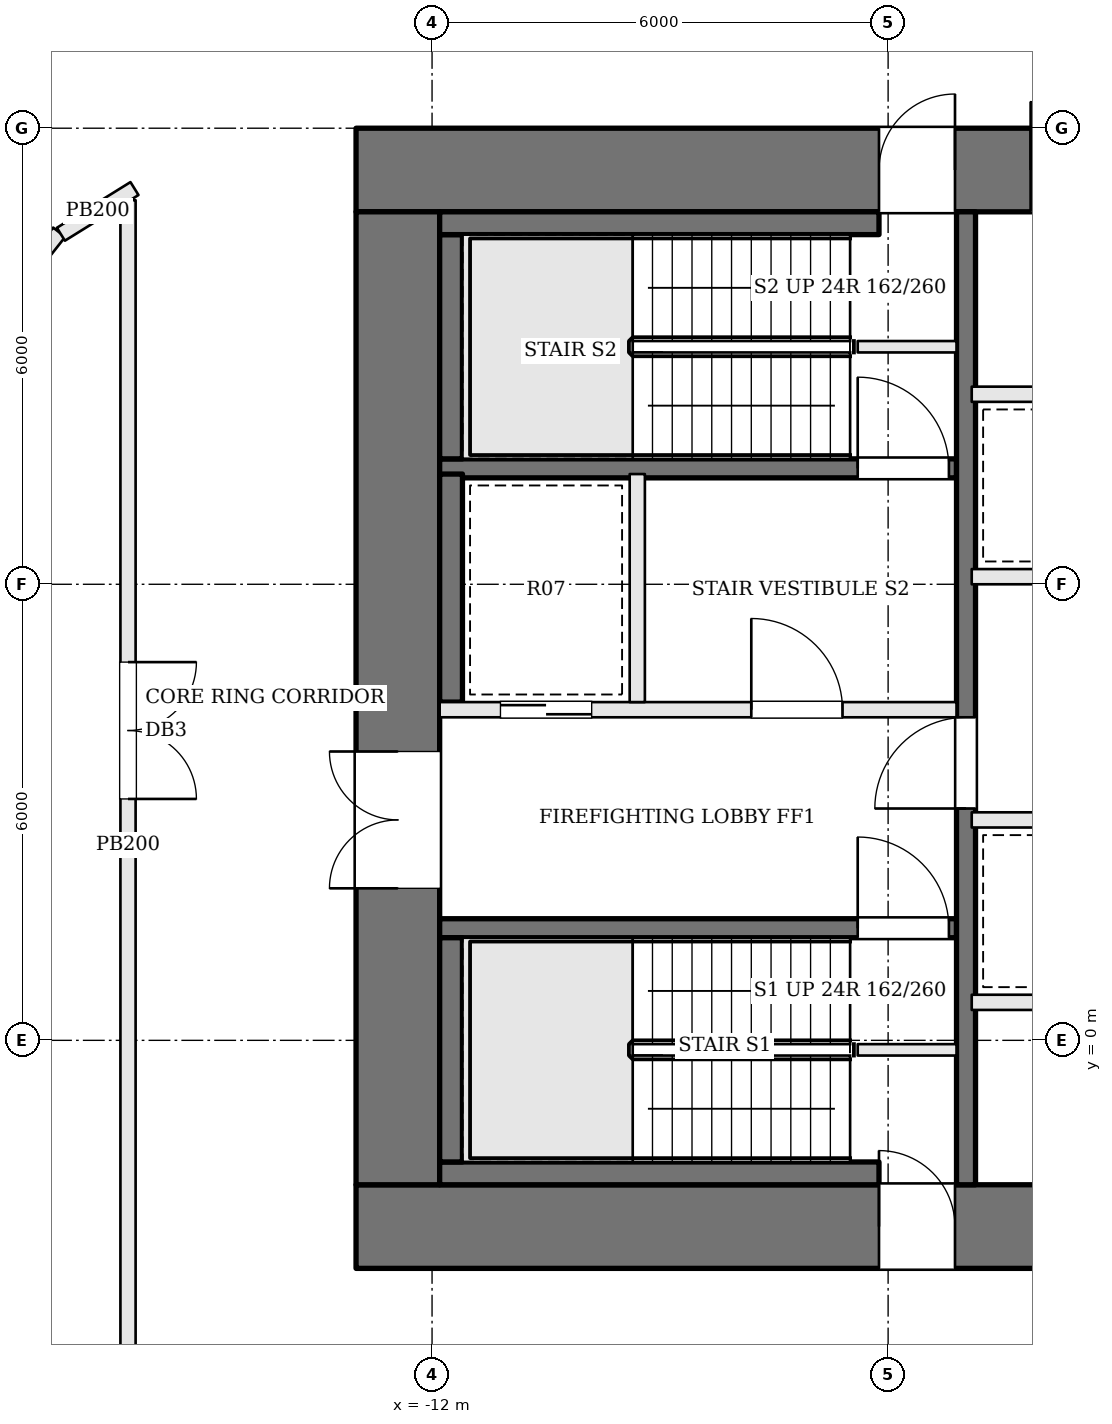
"""IFC4 building model, lengths in metres.
Left out: names, types, materials, properties, quantities, classifications, styles, units other than length and angle.
Written with IfcOpenShell. Run it as: python <this file> out.ifc"""

import sys

from ifc_helpers import new_model, si_unit, direction, frame, frame_2d, origin, place, context, subcontext, project, spatial, rectangle, extrude, element, fill, save


model = new_model("IFC4")
c1 = context("Model", 3, precision=1e-05, world=origin(), true_north=direction((0.0, 1.0)))
c2 = subcontext(c1, "Body", "Model", "MODEL_VIEW")
j1 = project(units=[si_unit("LENGTHUNIT", "METRE"), si_unit("PLANEANGLEUNIT", "RADIAN")], contexts=[c1])
p1 = place(None, origin())
s1 = spatial("IfcSite", under=j1, at=p1, CompositionType="ELEMENT")
p2 = place(p1, origin())
s2 = spatial("IfcBuilding", under=s1, at=p2, CompositionType="ELEMENT")
p3 = place(p2, frame((0.0, 0.0, 150.0)))
s3 = spatial("IfcBuildingStorey", under=s2, at=p3, CompositionType="ELEMENT", Elevation=150.0)
p4 = place(p3, frame((-13.0, 11.45, 0.0), z_axis=(0.0, 0.0, 1.0), x_axis=(1.0, 0.0, 0.0)))
e1 = element("IfcWall", 1, at=p4, inside=s3, PredefinedType="SHEAR", context=c2, shape_type="SweptSolid", body=[
    extrude(rectangle(XDim=26.0, YDim=1.1, at=frame_2d((13.0, 0.0))), origin(), (0.0, 0.0, 1.0), 3.9),
])
p5 = place(p4, frame((8.875, 0.0, 0.0)))
e2 = element("IfcOpeningElement", 2, at=p5, cuts=e1, PredefinedType="OPENING", context=c2, shape_type="SweptSolid", body=[
    extrude(rectangle(XDim=0.9, YDim=2.1, at=frame_2d((0.45, 1.05))), frame((0.0, 0.56, 0.0), z_axis=(0.0, -1.0, 0.0), x_axis=(1.0, 0.0, 0.0)), (0.0, 0.0, 1.0), 1.12),
])
p6 = place(p4, frame((11.425, 0.0, 0.0)))
e3 = element("IfcOpeningElement", 3, at=p6, cuts=e1, PredefinedType="OPENING", context=c2, shape_type="SweptSolid", body=[
    extrude(rectangle(XDim=0.7, YDim=2.1, at=frame_2d((0.35, 1.05))), frame((0.0, 0.56, 0.0), z_axis=(0.0, -1.0, 0.0), x_axis=(1.0, 0.0, 0.0)), (0.0, 0.0, 1.0), 1.12),
])
p7 = place(p4, frame((14.125, 0.0, 0.0)))
e4 = element("IfcOpeningElement", 4, at=p7, cuts=e1, PredefinedType="OPENING", context=c2, shape_type="SweptSolid", body=[
    extrude(rectangle(XDim=1.0, YDim=2.1, at=frame_2d((0.5, 1.05))), frame((0.0, 0.56, 0.0), z_axis=(0.0, -1.0, 0.0), x_axis=(1.0, 0.0, 0.0)), (0.0, 0.0, 1.0), 1.12),
])
p8 = place(p4, frame((16.725, 0.0, 0.0)))
e5 = element("IfcOpeningElement", 5, at=p8, cuts=e1, PredefinedType="OPENING", context=c2, shape_type="SweptSolid", body=[
    extrude(rectangle(XDim=0.7, YDim=2.1, at=frame_2d((0.35, 1.05))), frame((0.0, 0.56, 0.0), z_axis=(0.0, -1.0, 0.0), x_axis=(1.0, 0.0, 0.0)), (0.0, 0.0, 1.0), 1.12),
])
p9 = place(p4, frame((6.88, 0.0, 0.0)))
e6 = element("IfcOpeningElement", 6, at=p9, cuts=e1, PredefinedType="OPENING", context=c2, shape_type="SweptSolid", body=[
    extrude(rectangle(XDim=1.0, YDim=2.1, at=frame_2d((0.5, 1.05))), frame((0.0, 0.56, 0.0), z_axis=(0.0, -1.0, 0.0), x_axis=(1.0, 0.0, 0.0)), (0.0, 0.0, 1.0), 1.12),
])
p10 = place(p4, frame((18.12, 0.0, 0.0)))
e7 = element("IfcOpeningElement", 7, at=p10, cuts=e1, PredefinedType="OPENING", context=c2, shape_type="SweptSolid", body=[
    extrude(rectangle(XDim=1.0, YDim=2.1, at=frame_2d((0.5, 1.05))), frame((0.0, 0.56, 0.0), z_axis=(0.0, -1.0, 0.0), x_axis=(1.0, 0.0, 0.0)), (0.0, 0.0, 1.0), 1.12),
])
p11 = place(p3, frame((-13.0, -2.45, 0.0), z_axis=(0.0, 0.0, 1.0), x_axis=(1.0, 0.0, 0.0)))
e8 = element("IfcWall", 8, at=p11, inside=s3, PredefinedType="SHEAR", context=c2, shape_type="SweptSolid", body=[
    extrude(rectangle(XDim=26.0, YDim=1.1, at=frame_2d((13.0, 0.0))), origin(), (0.0, 0.0, 1.0), 3.9),
])
p12 = place(p11, frame((9.225, 0.0, 0.0)))
e9 = element("IfcOpeningElement", 9, at=p12, cuts=e8, PredefinedType="OPENING", context=c2, shape_type="SweptSolid", body=[
    extrude(rectangle(XDim=1.0, YDim=2.1, at=frame_2d((0.5, 1.05))), frame((0.0, 0.56, 0.0), z_axis=(0.0, -1.0, 0.0), x_axis=(1.0, 0.0, 0.0)), (0.0, 0.0, 1.0), 1.12),
])
p13 = place(p11, frame((11.825, 0.0, 0.0)))
e10 = element("IfcOpeningElement", 10, at=p13, cuts=e8, PredefinedType="OPENING", context=c2, shape_type="SweptSolid", body=[
    extrude(rectangle(XDim=0.7, YDim=2.1, at=frame_2d((0.35, 1.05))), frame((0.0, 0.56, 0.0), z_axis=(0.0, -1.0, 0.0), x_axis=(1.0, 0.0, 0.0)), (0.0, 0.0, 1.0), 1.12),
])
p14 = place(p11, frame((13.875, 0.0, 0.0)))
e11 = element("IfcOpeningElement", 11, at=p14, cuts=e8, PredefinedType="OPENING", context=c2, shape_type="SweptSolid", body=[
    extrude(rectangle(XDim=0.7, YDim=2.1, at=frame_2d((0.35, 1.05))), frame((0.0, 0.56, 0.0), z_axis=(0.0, -1.0, 0.0), x_axis=(1.0, 0.0, 0.0)), (0.0, 0.0, 1.0), 1.12),
])
p15 = place(p11, frame((16.225, 0.0, 0.0)))
e12 = element("IfcOpeningElement", 12, at=p15, cuts=e8, PredefinedType="OPENING", context=c2, shape_type="SweptSolid", body=[
    extrude(rectangle(XDim=0.9, YDim=2.1, at=frame_2d((0.45, 1.05))), frame((0.0, 0.56, 0.0), z_axis=(0.0, -1.0, 0.0), x_axis=(1.0, 0.0, 0.0)), (0.0, 0.0, 1.0), 1.12),
])
p16 = place(p11, frame((6.88, 0.0, 0.0)))
e13 = element("IfcOpeningElement", 13, at=p16, cuts=e8, PredefinedType="OPENING", context=c2, shape_type="SweptSolid", body=[
    extrude(rectangle(XDim=1.0, YDim=2.1, at=frame_2d((0.5, 1.05))), frame((0.0, 0.56, 0.0), z_axis=(0.0, -1.0, 0.0), x_axis=(1.0, 0.0, 0.0)), (0.0, 0.0, 1.0), 1.12),
])
p17 = place(p11, frame((18.12, 0.0, 0.0)))
e14 = element("IfcOpeningElement", 14, at=p17, cuts=e8, PredefinedType="OPENING", context=c2, shape_type="SweptSolid", body=[
    extrude(rectangle(XDim=1.0, YDim=2.1, at=frame_2d((0.5, 1.05))), frame((0.0, 0.56, 0.0), z_axis=(0.0, -1.0, 0.0), x_axis=(1.0, 0.0, 0.0)), (0.0, 0.0, 1.0), 1.12),
])
p18 = place(p3, frame((-12.45, -1.9, 0.0), z_axis=(0.0, 0.0, 1.0), x_axis=(0.0, 1.0, 0.0)))
e15 = element("IfcWall", 15, at=p18, inside=s3, PredefinedType="SHEAR", context=c2, shape_type="SweptSolid", body=[
    extrude(rectangle(XDim=12.8, YDim=1.1, at=frame_2d((6.4, 0.0))), origin(), (0.0, 0.0, 1.0), 3.9),
])
p19 = place(p18, frame((3.9, 0.0, 0.0)))
e16 = element("IfcOpeningElement", 16, at=p19, cuts=e15, PredefinedType="OPENING", context=c2, shape_type="SweptSolid", body=[
    extrude(rectangle(XDim=1.8, YDim=2.1, at=frame_2d((0.9, 1.05))), frame((0.0, 0.56, 0.0), z_axis=(0.0, -1.0, 0.0), x_axis=(1.0, 0.0, 0.0)), (0.0, 0.0, 1.0), 1.12),
])
for number, where, z_axis, x_axis in (
    (17, (-6.4, -0.125, 0.0), (0.0, 0.0, 1.0), (1.0, 0.0, 0.0)),
    (18, (-6.4, 9.125, 0.0), (0.0, 0.0, 1.0), (1.0, 0.0, 0.0)),
):
    element("IfcWall", number, at=place(p3, frame(where, z_axis=z_axis, x_axis=x_axis)), inside=s3, PredefinedType="SOLIDWALL", context=c2, shape_type="SweptSolid", body=[
        extrude(rectangle(XDim=1.3, YDim=0.15, at=frame_2d((0.65, 0.0))), origin(), (0.0, 0.0, 1.0), 3.7),
    ])
p20 = place(p3, frame((-11.9, 1.475, 0.0), z_axis=(0.0, 0.0, 1.0), x_axis=(1.0, 0.0, 0.0)))
e19 = element("IfcWall", 19, at=p20, inside=s3, PredefinedType="SOLIDWALL", context=c2, shape_type="SweptSolid", body=[
    extrude(rectangle(XDim=6.8, YDim=0.25, at=frame_2d((3.4, 0.0))), origin(), (0.0, 0.0, 1.0), 3.7),
])
p21 = place(p20, frame((5.5, 0.0, 0.0)))
e20 = element("IfcOpeningElement", 20, at=p21, cuts=e19, PredefinedType="OPENING", context=c2, shape_type="SweptSolid", body=[
    extrude(rectangle(XDim=1.2, YDim=2.1, at=frame_2d((0.6, 1.05))), frame((0.0, 0.135, 0.0), z_axis=(0.0, -1.0, 0.0), x_axis=(1.0, 0.0, 0.0)), (0.0, 0.0, 1.0), 0.27),
])
p22 = place(p3, frame((-11.9, 4.35, 0.0), z_axis=(0.0, 0.0, 1.0), x_axis=(1.0, 0.0, 0.0)))
e21 = element("IfcWall", 21, at=p22, inside=s3, PredefinedType="SOLIDWALL", context=c2, shape_type="SweptSolid", body=[
    extrude(rectangle(XDim=6.8, YDim=0.2, at=frame_2d((3.4, 0.0))), origin(), (0.0, 0.0, 1.0), 3.7),
])
p23 = place(p22, frame((4.1, 0.0, 0.0)))
e22 = element("IfcOpeningElement", 22, at=p23, cuts=e21, PredefinedType="OPENING", context=c2, shape_type="SweptSolid", body=[
    extrude(rectangle(XDim=1.2, YDim=2.1, at=frame_2d((0.6, 1.05))), frame((0.0, 0.11, 0.0), z_axis=(0.0, -1.0, 0.0), x_axis=(1.0, 0.0, 0.0)), (0.0, 0.0, 1.0), 0.22),
])
p24 = place(p22, frame((0.8, 0.0, 0.0)))
e23 = element("IfcOpeningElement", 23, at=p24, cuts=e21, PredefinedType="OPENING", context=c2, shape_type="SweptSolid", body=[
    extrude(rectangle(XDim=1.2, YDim=2.1, at=frame_2d((0.6, 1.05))), frame((0.0, 0.11, 0.0), z_axis=(0.0, -1.0, 0.0), x_axis=(1.0, 0.0, 0.0)), (0.0, 0.0, 1.0), 0.22),
])
p25 = place(p3, frame((-11.9, 7.525, 0.0), z_axis=(0.0, 0.0, 1.0), x_axis=(1.0, 0.0, 0.0)))
e24 = element("IfcWall", 24, at=p25, inside=s3, PredefinedType="SOLIDWALL", context=c2, shape_type="SweptSolid", body=[
    extrude(rectangle(XDim=6.8, YDim=0.25, at=frame_2d((3.4, 0.0))), origin(), (0.0, 0.0, 1.0), 3.7),
])
p26 = place(p25, frame((5.5, 0.0, 0.0)))
e25 = element("IfcOpeningElement", 25, at=p26, cuts=e24, PredefinedType="OPENING", context=c2, shape_type="SweptSolid", body=[
    extrude(rectangle(XDim=1.2, YDim=2.1, at=frame_2d((0.6, 1.05))), frame((0.0, 0.135, 0.0), z_axis=(0.0, -1.0, 0.0), x_axis=(1.0, 0.0, 0.0)), (0.0, 0.0, 1.0), 0.27),
])
p27 = place(p3, frame((-9.3, 4.45, 0.0), z_axis=(0.0, 0.0, 1.0), x_axis=(0.0, 1.0, 0.0)))
e26 = element("IfcWall", 26, at=p27, inside=s3, PredefinedType="SOLIDWALL", context=c2, shape_type="SweptSolid", body=[
    extrude(rectangle(XDim=3.0, YDim=0.2, at=frame_2d((1.5, 0.0))), origin(), (0.0, 0.0, 1.0), 3.7),
])
p28 = place(p3, frame((-4.975, -1.9, 0.0), z_axis=(0.0, 0.0, 1.0), x_axis=(0.0, 1.0, 0.0)))
e27 = element("IfcWall", 27, at=p28, inside=s3, PredefinedType="SOLIDWALL", context=c2, shape_type="SweptSolid", body=[
    extrude(rectangle(XDim=12.8, YDim=0.25, at=frame_2d((6.4, 0.0))), origin(), (0.0, 0.0, 1.0), 3.7),
])
p29 = place(p28, frame((4.95, 0.0, 0.0)))
e28 = element("IfcOpeningElement", 28, at=p29, cuts=e27, PredefinedType="OPENING", context=c2, shape_type="SweptSolid", body=[
    extrude(rectangle(XDim=1.2, YDim=2.1, at=frame_2d((0.6, 1.05))), frame((0.0, 0.135, 0.0), z_axis=(0.0, -1.0, 0.0), x_axis=(1.0, 0.0, 0.0)), (0.0, 0.0, 1.0), 0.27),
])
p30 = place(p3, frame((-11.9, -1.75, 0.0), z_axis=(0.0, 0.0, 1.0), x_axis=(1.0, 0.0, 0.0)))
e29 = element("IfcWall", 29, at=p30, inside=s3, PredefinedType="SOLIDWALL", context=c2, shape_type="SweptSolid", body=[
    extrude(rectangle(XDim=5.78, YDim=0.3, at=frame_2d((2.89, 0.0))), origin(), (0.0, 0.0, 1.0), 3.7),
])
p31 = place(p3, frame((-11.75, -1.6, 0.0), z_axis=(0.0, 0.0, 1.0), x_axis=(0.0, 1.0, 0.0)))
e30 = element("IfcWall", 30, at=p31, inside=s3, PredefinedType="SOLIDWALL", context=c2, shape_type="SweptSolid", body=[
    extrude(rectangle(XDim=2.95, YDim=0.3, at=frame_2d((1.475, 0.0))), origin(), (0.0, 0.0, 1.0), 3.7),
])
p32 = place(p3, frame((-11.75, 4.45, 0.0), z_axis=(0.0, 0.0, 1.0), x_axis=(0.0, 1.0, 0.0)))
e31 = element("IfcWall", 31, at=p32, inside=s3, PredefinedType="SOLIDWALL", context=c2, shape_type="SweptSolid", body=[
    extrude(rectangle(XDim=3.0, YDim=0.3, at=frame_2d((1.5, 0.0))), origin(), (0.0, 0.0, 1.0), 3.7),
])
p33 = place(p3, frame((-11.75, 7.65, 0.0), z_axis=(0.0, 0.0, 1.0), x_axis=(0.0, 1.0, 0.0)))
e32 = element("IfcWall", 32, at=p33, inside=s3, PredefinedType="SOLIDWALL", context=c2, shape_type="SweptSolid", body=[
    extrude(rectangle(XDim=2.95, YDim=0.3, at=frame_2d((1.475, 0.0))), origin(), (0.0, 0.0, 1.0), 3.7),
])
p34 = place(p3, frame((-11.9, 10.75, 0.0), z_axis=(0.0, 0.0, 1.0), x_axis=(1.0, 0.0, 0.0)))
e33 = element("IfcWall", 33, at=p34, inside=s3, PredefinedType="SOLIDWALL", context=c2, shape_type="SweptSolid", body=[
    extrude(rectangle(XDim=5.78, YDim=0.3, at=frame_2d((2.89, 0.0))), origin(), (0.0, 0.0, 1.0), 3.7),
])
p35 = place(p3, frame((-4.9, 0.5, 0.0), z_axis=(0.0, 0.0, 1.0), x_axis=(1.0, 0.0, 0.0)))
e34 = element("IfcWall", 34, at=p35, inside=s3, PredefinedType="SOLIDWALL", context=c2, shape_type="SweptSolid", body=[
    extrude(rectangle(XDim=9.8, YDim=0.2, at=frame_2d((4.9, 0.0))), origin(), (0.0, 0.0, 1.0), 3.7),
])
p36 = place(p3, frame((-4.9, 2.9, 0.0), z_axis=(0.0, 0.0, 1.0), x_axis=(1.0, 0.0, 0.0)))
e35 = element("IfcWall", 35, at=p36, inside=s3, PredefinedType="SOLIDWALL", context=c2, shape_type="SweptSolid", body=[
    extrude(rectangle(XDim=9.8, YDim=0.2, at=frame_2d((4.9, 0.0))), origin(), (0.0, 0.0, 1.0), 3.7),
])
p37 = place(p36, frame((2.613, 0.0, 0.0)))
e36 = element("IfcOpeningElement", 36, at=p37, cuts=e35, PredefinedType="OPENING", context=c2, shape_type="SweptSolid", body=[
    extrude(rectangle(XDim=0.9, YDim=2.1, at=frame_2d((0.45, 1.05))), frame((0.0, 0.11, 0.0), z_axis=(0.0, -1.0, 0.0), x_axis=(1.0, 0.0, 0.0)), (0.0, 0.0, 1.0), 0.22),
])
p38 = place(p36, frame((7.463, 0.0, 0.0)))
e37 = element("IfcOpeningElement", 37, at=p38, cuts=e35, PredefinedType="OPENING", context=c2, shape_type="SweptSolid", body=[
    extrude(rectangle(XDim=1.0, YDim=2.1, at=frame_2d((0.5, 1.05))), frame((0.0, 0.11, 0.0), z_axis=(0.0, -1.0, 0.0), x_axis=(1.0, 0.0, 0.0)), (0.0, 0.0, 1.0), 0.22),
])
for number, where, z_axis, x_axis in (
    (38, (-4.9, 6.1, 0.0), (0.0, 0.0, 1.0), (1.0, 0.0, 0.0)),
    (39, (-4.9, 8.5, 0.0), (0.0, 0.0, 1.0), (1.0, 0.0, 0.0)),
):
    element("IfcWall", number, at=place(p3, frame(where, z_axis=z_axis, x_axis=x_axis)), inside=s3, PredefinedType="SOLIDWALL", context=c2, shape_type="SweptSolid", body=[
        extrude(rectangle(XDim=9.8, YDim=0.2, at=frame_2d((4.9, 0.0))), origin(), (0.0, 0.0, 1.0), 3.7),
    ])
p39 = place(p3, frame((-19.849, 6.895, 0.0), z_axis=(0.0, 0.0, 1.0), x_axis=(0.618811760178, 0.785539308669, 0.0)))
e40 = element("IfcWall", 40, at=p39, inside=s3, PredefinedType="PARTITIONING", context=c2, shape_type="SweptSolid", body=[
    extrude(rectangle(XDim=4.756, YDim=0.2, at=frame_2d((2.378, 0.0))), origin(), (0.0, 0.0, 1.0), 3.7),
])
p40 = place(p3, frame((-16.883, 10.605, 0.0), z_axis=(0.0, 0.0, 1.0), x_axis=(0.84954745962, 0.527512193085, 0.0)))
e41 = element("IfcWall", 41, at=p40, inside=s3, PredefinedType="PARTITIONING", context=c2, shape_type="SweptSolid", body=[
    extrude(rectangle(XDim=1.139, YDim=0.2, at=frame_2d((0.57, 0.0))), origin(), (0.0, 0.0, 1.0), 3.7),
])
p41 = place(p3, frame((-16.0, 11.053, 0.0), z_axis=(0.0, 0.0, 1.0), x_axis=(0.0, -1.0, 0.0)))
e42 = element("IfcWall", 42, at=p41, inside=s3, PredefinedType="PARTITIONING", context=c2, shape_type="SweptSolid", body=[
    extrude(rectangle(XDim=16.953, YDim=0.2, at=frame_2d((8.477, 0.0))), origin(), (0.0, 0.0, 1.0), 3.7),
])
p42 = place(p41, frame((6.077, 0.0, 0.0)))
e43 = element("IfcOpeningElement", 43, at=p42, cuts=e42, PredefinedType="OPENING", context=c2, shape_type="SweptSolid", body=[
    extrude(rectangle(XDim=1.8, YDim=2.1, at=frame_2d((0.9, 1.05))), frame((0.0, 0.11, 0.0), z_axis=(0.0, -1.0, 0.0), x_axis=(1.0, 0.0, 0.0)), (0.0, 0.0, 1.0), 0.22),
])
p43 = place(p19, origin())
e44 = element("IfcDoor", 44, at=p43, inside=s3, OperationType="DOUBLE_DOOR_SINGLE_SWING", PredefinedType="DOOR", context=c2, shape_type="SweptSolid", body=[
    extrude(rectangle(XDim=1.8, YDim=2.1, at=frame_2d((0.9, 1.05))), frame((0.0, 0.025, 0.0), z_axis=(0.0, -1.0, 0.0), x_axis=(1.0, 0.0, 0.0)), (0.0, 0.0, 1.0), 0.05),
])
fill(e16, e44)
p44 = place(p29, origin())
e45 = element("IfcDoor", 45, at=p44, inside=s3, OperationType="SINGLE_SWING_LEFT", PredefinedType="DOOR", context=c2, shape_type="SweptSolid", body=[
    extrude(rectangle(XDim=1.2, YDim=2.1, at=frame_2d((0.6, 1.05))), frame((0.0, 0.025, 0.0), z_axis=(0.0, -1.0, 0.0), x_axis=(1.0, 0.0, 0.0)), (0.0, 0.0, 1.0), 0.05),
])
fill(e28, e45)
p45 = place(p23, origin())
e46 = element("IfcDoor", 46, at=p45, inside=s3, OperationType="SINGLE_SWING_LEFT", PredefinedType="DOOR", context=c2, shape_type="SweptSolid", body=[
    extrude(rectangle(XDim=1.2, YDim=2.1, at=frame_2d((0.6, 1.05))), frame((0.0, 0.025, 0.0), z_axis=(0.0, -1.0, 0.0), x_axis=(1.0, 0.0, 0.0)), (0.0, 0.0, 1.0), 0.05),
])
fill(e22, e46)
p46 = place(p21, origin())
e47 = element("IfcDoor", 47, at=p46, inside=s3, OperationType="SINGLE_SWING_LEFT", PredefinedType="DOOR", context=c2, shape_type="SweptSolid", body=[
    extrude(rectangle(XDim=1.2, YDim=2.1, at=frame_2d((0.6, 1.05))), frame((0.0, 0.025, 0.0), z_axis=(0.0, -1.0, 0.0), x_axis=(1.0, 0.0, 0.0)), (0.0, 0.0, 1.0), 0.05),
])
fill(e20, e47)
p47 = place(p26, origin())
e48 = element("IfcDoor", 48, at=p47, inside=s3, OperationType="SINGLE_SWING_LEFT", PredefinedType="DOOR", context=c2, shape_type="SweptSolid", body=[
    extrude(rectangle(XDim=1.2, YDim=2.1, at=frame_2d((0.6, 1.05))), frame((0.0, 0.025, 0.0), z_axis=(0.0, -1.0, 0.0), x_axis=(1.0, 0.0, 0.0)), (0.0, 0.0, 1.0), 0.05),
])
fill(e25, e48)
p48 = place(p24, origin())
e49 = element("IfcDoor", 49, at=p48, inside=s3, OperationType="SLIDING_TO_RIGHT", PredefinedType="DOOR", context=c2, shape_type="SweptSolid", body=[
    extrude(rectangle(XDim=1.2, YDim=2.1, at=frame_2d((0.6, 1.05))), frame((0.0, 0.025, 0.0), z_axis=(0.0, -1.0, 0.0), x_axis=(1.0, 0.0, 0.0)), (0.0, 0.0, 1.0), 0.05),
])
fill(e23, e49)
p49 = place(p5, origin())
e50 = element("IfcDoor", 50, at=p49, inside=s3, OperationType="SINGLE_SWING_LEFT", PredefinedType="DOOR", context=c2, shape_type="SweptSolid", body=[
    extrude(rectangle(XDim=0.9, YDim=2.1, at=frame_2d((0.45, 1.05))), frame((0.0, 0.025, 0.0), z_axis=(0.0, -1.0, 0.0), x_axis=(1.0, 0.0, 0.0)), (0.0, 0.0, 1.0), 0.05),
])
fill(e2, e50)
p50 = place(p16, origin())
e51 = element("IfcDoor", 51, at=p50, inside=s3, OperationType="SINGLE_SWING_LEFT", PredefinedType="DOOR", context=c2, shape_type="SweptSolid", body=[
    extrude(rectangle(XDim=1.0, YDim=2.1, at=frame_2d((0.5, 1.05))), frame((0.0, 0.025, 0.0), z_axis=(0.0, -1.0, 0.0), x_axis=(1.0, 0.0, 0.0)), (0.0, 0.0, 1.0), 0.05),
])
fill(e13, e51)
p51 = place(p9, origin())
e52 = element("IfcDoor", 52, at=p51, inside=s3, OperationType="SINGLE_SWING_RIGHT", PredefinedType="DOOR", context=c2, shape_type="SweptSolid", body=[
    extrude(rectangle(XDim=1.0, YDim=2.1, at=frame_2d((0.5, 1.05))), frame((0.0, 0.025, 0.0), z_axis=(0.0, -1.0, 0.0), x_axis=(1.0, 0.0, 0.0)), (0.0, 0.0, 1.0), 0.05),
])
fill(e6, e52)
p52 = place(p42, origin())
e53 = element("IfcDoor", 53, at=p52, inside=s3, OperationType="DOUBLE_DOOR_SINGLE_SWING", PredefinedType="DOOR", context=c2, shape_type="SweptSolid", body=[
    extrude(rectangle(XDim=1.8, YDim=2.1, at=frame_2d((0.9, 1.05))), frame((0.0, 0.025, 0.0), z_axis=(0.0, -1.0, 0.0), x_axis=(1.0, 0.0, 0.0)), (0.0, 0.0, 1.0), 0.05),
])
fill(e43, e53)
save(model, sys.argv[1])
